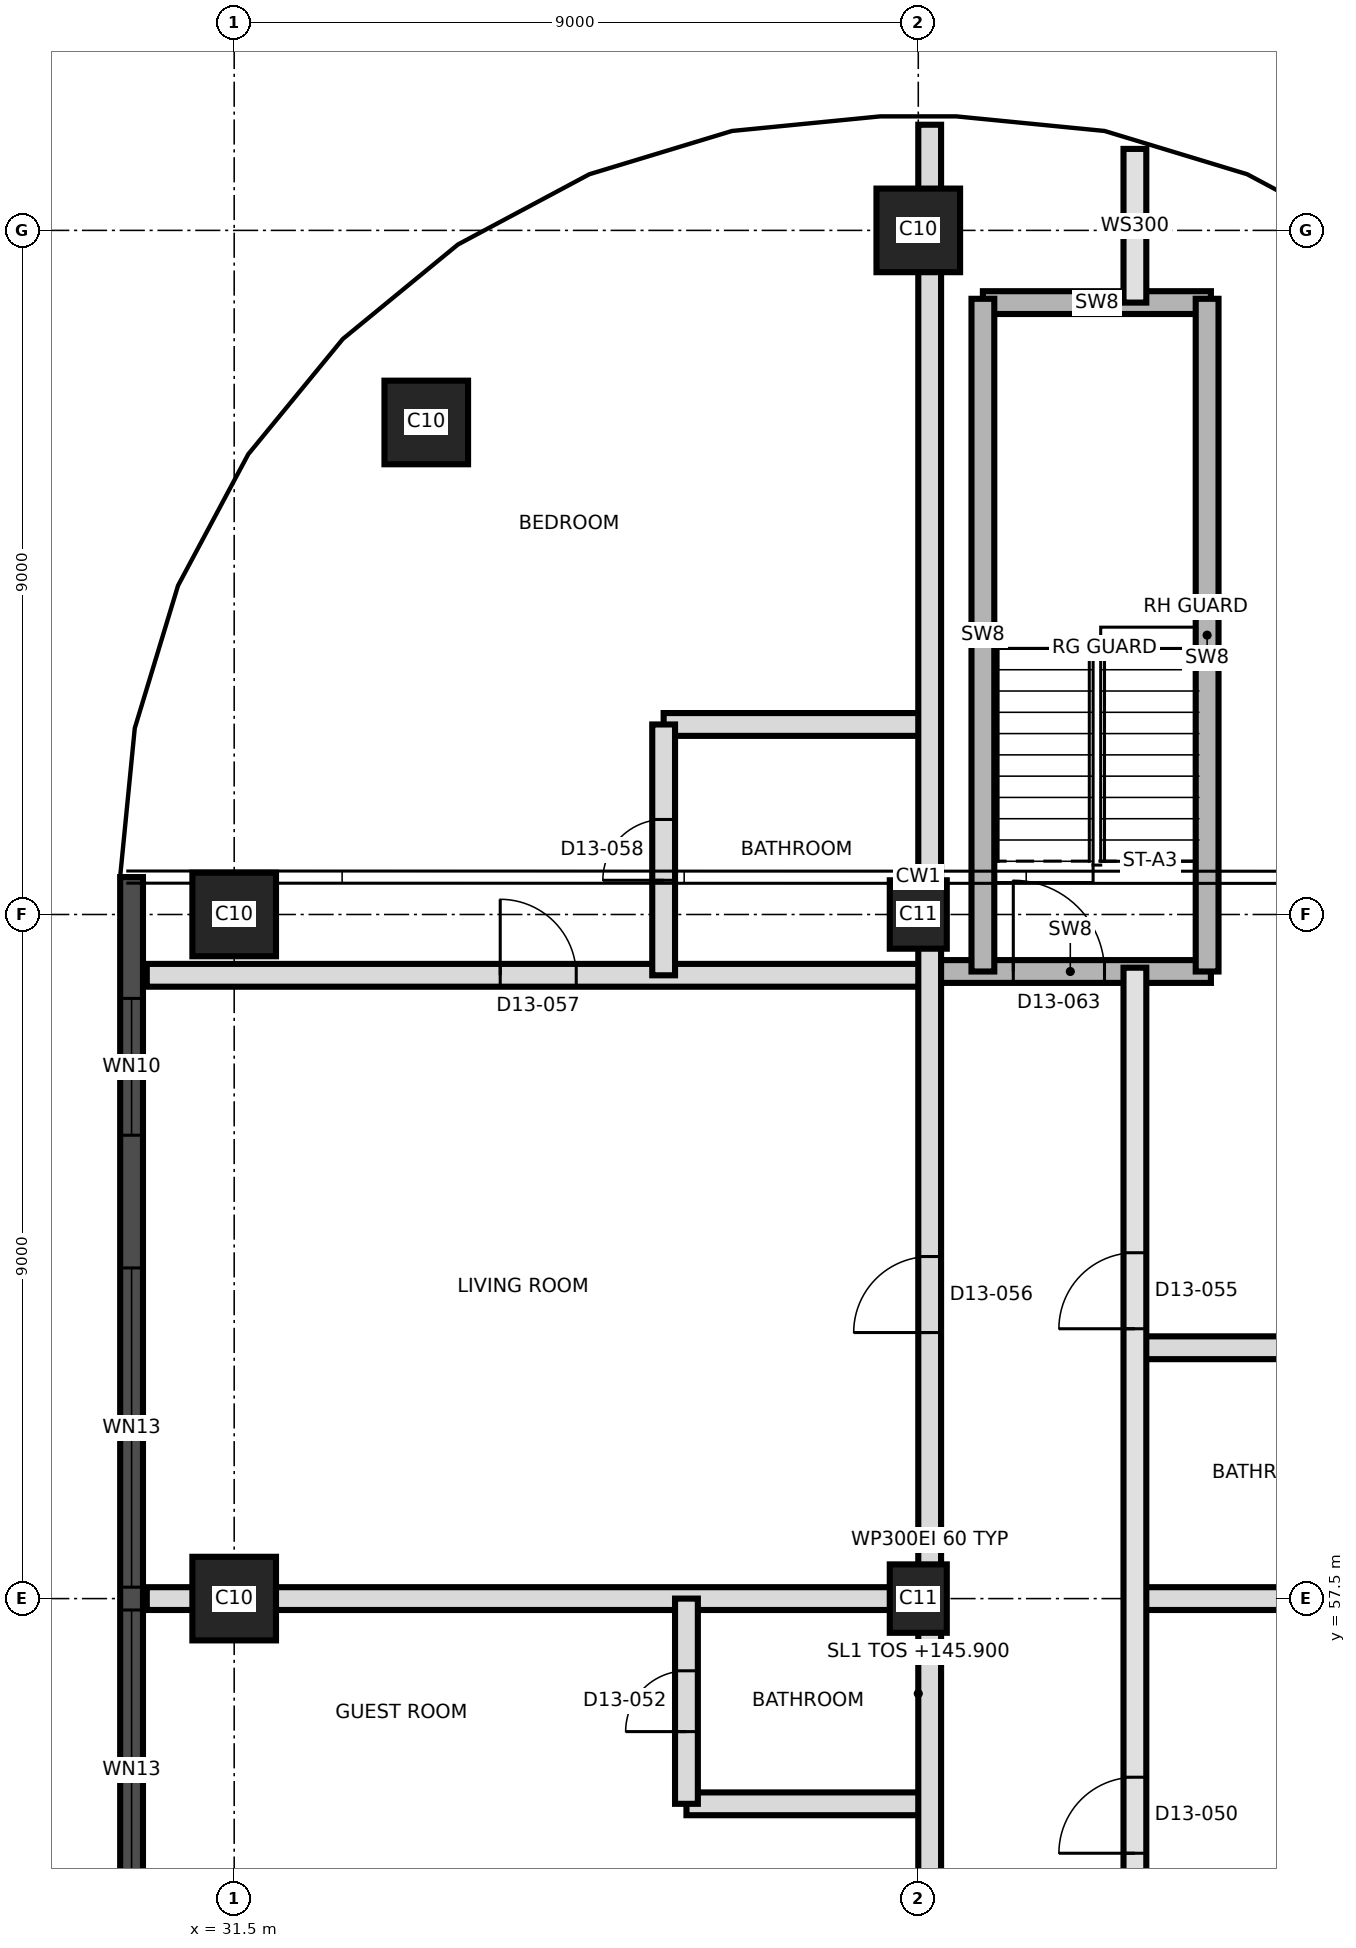
"""IFC4 building model, lengths in metres.
Left out: names, types, materials, properties, quantities, classifications, styles, units other than length and angle.
Written with IfcOpenShell. Run it as: python <this file> out.ifc"""

import sys

from ifc_helpers import new_model, si_unit, direction, frame, frame_2d, origin, origin_2d, place, context, subcontext, project, spatial, rectangle, extrude, element, fill, save


model = new_model("IFC4")
c1 = context("Model", 3, precision=1e-05, world=origin(), true_north=direction((0.0, 1.0)))
c2 = subcontext(c1, "Body", "Model", "MODEL_VIEW")
j1 = project(units=[si_unit("LENGTHUNIT", "METRE"), si_unit("PLANEANGLEUNIT", "RADIAN")], contexts=[c1])
p1 = place(None, origin())
s1 = spatial("IfcSite", under=j1, at=p1, CompositionType="ELEMENT")
p2 = place(p1, origin())
s2 = spatial("IfcBuilding", under=s1, at=p2, CompositionType="ELEMENT")
p3 = place(p2, frame((0.0, 0.0, 145.9)))
s3 = spatial("IfcBuildingStorey", under=s2, at=p3, CompositionType="ELEMENT", Elevation=145.9)
p4 = place(p3, frame((31.5, 57.5, 0.0), z_axis=(0.0, 0.0, 1.0), x_axis=(1.0, 0.0, 0.0)))
e1 = element("IfcColumn", 1, at=p4, inside=s3, PredefinedType="COLUMN", context=c2, shape_type="SweptSolid", body=[
    extrude(rectangle(XDim=1.1, YDim=1.1, at=origin_2d()), origin(), (0.0, 0.0, 1.0), 3.7),
])
p5 = place(p3, frame((40.5, 57.5, 0.0), z_axis=(0.0, 0.0, 1.0), x_axis=(0.0, 1.0, 0.0)))
e2 = element("IfcColumn", 2, at=p5, inside=s3, PredefinedType="COLUMN", context=c2, shape_type="SweptSolid", body=[
    extrude(rectangle(XDim=0.9, YDim=0.75, at=origin_2d()), origin(), (0.0, 0.0, 1.0), 3.7),
])
p6 = place(p3, frame((31.5, 66.5, 0.0), z_axis=(0.0, 0.0, 1.0), x_axis=(1.0, 0.0, 0.0)))
e3 = element("IfcColumn", 3, at=p6, inside=s3, PredefinedType="COLUMN", context=c2, shape_type="SweptSolid", body=[
    extrude(rectangle(XDim=1.1, YDim=1.1, at=origin_2d()), origin(), (0.0, 0.0, 1.0), 3.7),
])
p7 = place(p3, frame((40.5, 66.5, 0.0), z_axis=(0.0, 0.0, 1.0), x_axis=(0.0, 1.0, 0.0)))
e4 = element("IfcColumn", 4, at=p7, inside=s3, PredefinedType="COLUMN", context=c2, shape_type="SweptSolid", body=[
    extrude(rectangle(XDim=0.9, YDim=0.75, at=origin_2d()), origin(), (0.0, 0.0, 1.0), 3.7),
])
for number, where, z_axis, x_axis in (
    (5, (34.027, 72.973, 0.0), (0.0, 0.0, 1.0), (1.0, 0.0, 0.0)),
    (6, (40.5, 75.5, 0.0), (0.0, 0.0, 1.0), (1.0, 0.0, 0.0)),
):
    element("IfcColumn", number, at=place(p3, frame(where, z_axis=z_axis, x_axis=x_axis)), inside=s3, PredefinedType="COLUMN", context=c2, shape_type="SweptSolid", body=[
        extrude(rectangle(XDim=1.1, YDim=1.1, at=origin_2d()), origin(), (0.0, 0.0, 1.0), 3.7),
    ])
p8 = place(p3, frame((30.15, 66.992, 0.0), z_axis=(0.0, 0.0, 1.0), x_axis=(0.0, -1.0, 0.0)))
e7 = element("IfcWall", 7, at=p8, inside=s3, PredefinedType="SOLIDWALL", context=c2, shape_type="SweptSolid", body=[
    extrude(rectangle(XDim=32.968, YDim=0.3, at=frame_2d((16.484, 0.0))), origin(), (0.0, 0.0, 1.0), 3.4),
])
p9 = place(p8, frame((1.596, 0.0, 0.3)))
e8 = element("IfcOpeningElement", 8, at=p9, cuts=e7, PredefinedType="OPENING", context=c2, shape_type="SweptSolid", body=[
    extrude(rectangle(XDim=1.8, YDim=2.4, at=frame_2d((0.9, 1.2))), frame((0.0, 0.16, 0.0), z_axis=(0.0, -1.0, 0.0), x_axis=(1.0, 0.0, 0.0)), (0.0, 0.0, 1.0), 0.32),
])
p10 = place(p8, frame((5.142, 0.0, 0.9)))
e9 = element("IfcOpeningElement", 9, at=p10, cuts=e7, PredefinedType="OPENING", context=c2, shape_type="SweptSolid", body=[
    extrude(rectangle(XDim=4.2, YDim=1.7, at=frame_2d((2.1, 0.85))), frame((0.0, 0.16, 0.0), z_axis=(0.0, -1.0, 0.0), x_axis=(1.0, 0.0, 0.0)), (0.0, 0.0, 1.0), 0.32),
])
p11 = place(p8, frame((9.642, 0.0, 0.9)))
e10 = element("IfcOpeningElement", 10, at=p11, cuts=e7, PredefinedType="OPENING", context=c2, shape_type="SweptSolid", body=[
    extrude(rectangle(XDim=4.2, YDim=1.7, at=frame_2d((2.1, 0.85))), frame((0.0, 0.16, 0.0), z_axis=(0.0, -1.0, 0.0), x_axis=(1.0, 0.0, 0.0)), (0.0, 0.0, 1.0), 0.32),
])
p12 = place(p8, frame((14.142, 0.0, 0.9)))
e11 = element("IfcOpeningElement", 11, at=p12, cuts=e7, PredefinedType="OPENING", context=c2, shape_type="SweptSolid", body=[
    extrude(rectangle(XDim=4.2, YDim=1.7, at=frame_2d((2.1, 0.85))), frame((0.0, 0.16, 0.0), z_axis=(0.0, -1.0, 0.0), x_axis=(1.0, 0.0, 0.0)), (0.0, 0.0, 1.0), 0.32),
])
p13 = place(p8, frame((18.642, 0.0, 0.9)))
e12 = element("IfcOpeningElement", 12, at=p13, cuts=e7, PredefinedType="OPENING", context=c2, shape_type="SweptSolid", body=[
    extrude(rectangle(XDim=4.2, YDim=1.7, at=frame_2d((2.1, 0.85))), frame((0.0, 0.16, 0.0), z_axis=(0.0, -1.0, 0.0), x_axis=(1.0, 0.0, 0.0)), (0.0, 0.0, 1.0), 0.32),
])
p14 = place(p8, frame((23.142, 0.0, 0.9)))
e13 = element("IfcOpeningElement", 13, at=p14, cuts=e7, PredefinedType="OPENING", context=c2, shape_type="SweptSolid", body=[
    extrude(rectangle(XDim=4.2, YDim=1.7, at=frame_2d((2.1, 0.85))), frame((0.0, 0.16, 0.0), z_axis=(0.0, -1.0, 0.0), x_axis=(1.0, 0.0, 0.0)), (0.0, 0.0, 1.0), 0.32),
])
p15 = place(p8, frame((29.33, 0.0, 0.3)))
e14 = element("IfcOpeningElement", 14, at=p15, cuts=e7, PredefinedType="OPENING", context=c2, shape_type="SweptSolid", body=[
    extrude(rectangle(XDim=1.8, YDim=2.4, at=frame_2d((0.9, 1.2))), frame((0.0, 0.16, 0.0), z_axis=(0.0, -1.0, 0.0), x_axis=(1.0, 0.0, 0.0)), (0.0, 0.0, 1.0), 0.32),
])
p16 = place(p3, frame((37.45, 54.8, 0.0), z_axis=(0.0, 0.0, 1.0), x_axis=(1.0, 0.0, 0.0)))
e15 = element("IfcWall", 15, at=p16, inside=s3, PredefinedType="PARTITIONING", context=c2, shape_type="SweptSolid", body=[
    extrude(rectangle(XDim=3.2, YDim=0.3, at=frame_2d((1.6, 0.0))), origin(), (0.0, 0.0, 1.0), 3.4),
])
p17 = place(p3, frame((30.35, 57.5, 0.0), z_axis=(0.0, 0.0, 1.0), x_axis=(1.0, 0.0, 0.0)))
e16 = element("IfcWall", 16, at=p17, inside=s3, PredefinedType="PARTITIONING", context=c2, shape_type="SweptSolid", body=[
    extrude(rectangle(XDim=10.3, YDim=0.3, at=frame_2d((5.15, 0.0))), origin(), (0.0, 0.0, 1.0), 3.4),
])
p18 = place(p3, frame((43.35, 57.5, 0.0), z_axis=(0.0, 0.0, 1.0), x_axis=(1.0, 0.0, 0.0)))
e17 = element("IfcWall", 17, at=p18, inside=s3, PredefinedType="PARTITIONING", context=c2, shape_type="SweptSolid", body=[
    extrude(rectangle(XDim=7.48, YDim=0.3, at=frame_2d((3.74, 0.0))), origin(), (0.0, 0.0, 1.0), 3.4),
])
p19 = place(p3, frame((43.35, 60.8, 0.0), z_axis=(0.0, 0.0, 1.0), x_axis=(1.0, 0.0, 0.0)))
e18 = element("IfcWall", 18, at=p19, inside=s3, PredefinedType="PARTITIONING", context=c2, shape_type="SweptSolid", body=[
    extrude(rectangle(XDim=3.5, YDim=0.3, at=frame_2d((1.75, 0.0))), origin(), (0.0, 0.0, 1.0), 3.4),
])
p20 = place(p3, frame((30.35, 65.7, 0.0), z_axis=(0.0, 0.0, 1.0), x_axis=(1.0, 0.0, 0.0)))
e19 = element("IfcWall", 19, at=p20, inside=s3, PredefinedType="PARTITIONING", context=c2, shape_type="SweptSolid", body=[
    extrude(rectangle(XDim=10.3, YDim=0.3, at=frame_2d((5.15, 0.0))), origin(), (0.0, 0.0, 1.0), 3.4),
])
p21 = place(p20, frame((4.65, 0.0, 0.0)))
e20 = element("IfcOpeningElement", 20, at=p21, cuts=e19, PredefinedType="OPENING", context=c2, shape_type="SweptSolid", body=[
    extrude(rectangle(XDim=1.0, YDim=2.1, at=frame_2d((0.5, 1.05))), frame((0.0, 0.16, 0.0), z_axis=(0.0, -1.0, 0.0), x_axis=(1.0, 0.0, 0.0)), (0.0, 0.0, 1.0), 0.32),
])
p22 = place(p3, frame((40.65, 65.75, 0.0), z_axis=(0.0, 0.0, 1.0), x_axis=(1.0, 0.0, 0.0)))
e21 = element("IfcWall", 21, at=p22, inside=s3, PredefinedType="SHEAR", context=c2, shape_type="SweptSolid", body=[
    extrude(rectangle(XDim=3.7, YDim=0.3, at=frame_2d((1.85, 0.0))), origin(), (0.0, 0.0, 1.0), 3.4),
])
p23 = place(p22, frame((1.1, 0.0, 0.0)))
e22 = element("IfcOpeningElement", 22, at=p23, cuts=e21, PredefinedType="OPENING", context=c2, shape_type="SweptSolid", body=[
    extrude(rectangle(XDim=1.2, YDim=2.1, at=frame_2d((0.6, 1.05))), frame((0.0, 0.16, 0.0), z_axis=(0.0, -1.0, 0.0), x_axis=(1.0, 0.0, 0.0)), (0.0, 0.0, 1.0), 0.32),
])
p24 = place(p3, frame((37.15, 69.0, 0.0), z_axis=(0.0, 0.0, 1.0), x_axis=(1.0, 0.0, 0.0)))
e23 = element("IfcWall", 23, at=p24, inside=s3, PredefinedType="PARTITIONING", context=c2, shape_type="SweptSolid", body=[
    extrude(rectangle(XDim=3.5, YDim=0.3, at=frame_2d((1.75, 0.0))), origin(), (0.0, 0.0, 1.0), 3.4),
])
p25 = place(p3, frame((41.35, 74.55, 0.0), z_axis=(0.0, 0.0, 1.0), x_axis=(1.0, 0.0, 0.0)))
e24 = element("IfcWall", 24, at=p25, inside=s3, PredefinedType="SHEAR", context=c2, shape_type="SweptSolid", body=[
    extrude(rectangle(XDim=3.0, YDim=0.3, at=frame_2d((1.5, 0.0))), origin(), (0.0, 0.0, 1.0), 3.4),
])
p26 = place(p3, frame((37.15, 65.7, 0.0), z_axis=(0.0, 0.0, 1.0), x_axis=(0.0, 1.0, 0.0)))
e25 = element("IfcWall", 25, at=p26, inside=s3, PredefinedType="PARTITIONING", context=c2, shape_type="SweptSolid", body=[
    extrude(rectangle(XDim=3.3, YDim=0.3, at=frame_2d((1.65, 0.0))), origin(), (0.0, 0.0, 1.0), 3.4),
])
p27 = place(p26, frame((1.25, 0.0, 0.0)))
e26 = element("IfcOpeningElement", 26, at=p27, cuts=e25, PredefinedType="OPENING", context=c2, shape_type="SweptSolid", body=[
    extrude(rectangle(XDim=0.8, YDim=2.1, at=frame_2d((0.4, 1.05))), frame((0.0, 0.16, 0.0), z_axis=(0.0, -1.0, 0.0), x_axis=(1.0, 0.0, 0.0)), (0.0, 0.0, 1.0), 0.32),
])
p28 = place(p3, frame((37.45, 54.8, 0.0), z_axis=(0.0, 0.0, 1.0), x_axis=(0.0, 1.0, 0.0)))
e27 = element("IfcWall", 27, at=p28, inside=s3, PredefinedType="PARTITIONING", context=c2, shape_type="SweptSolid", body=[
    extrude(rectangle(XDim=2.7, YDim=0.3, at=frame_2d((1.35, 0.0))), origin(), (0.0, 0.0, 1.0), 3.4),
])
p29 = place(p28, frame((0.95, 0.0, 0.0)))
e28 = element("IfcOpeningElement", 28, at=p29, cuts=e27, PredefinedType="OPENING", context=c2, shape_type="SweptSolid", body=[
    extrude(rectangle(XDim=0.8, YDim=2.1, at=frame_2d((0.4, 1.05))), frame((0.0, 0.16, 0.0), z_axis=(0.0, -1.0, 0.0), x_axis=(1.0, 0.0, 0.0)), (0.0, 0.0, 1.0), 0.32),
])
p30 = place(p3, frame((40.65, 39.65, 0.0), z_axis=(0.0, 0.0, 1.0), x_axis=(0.0, 1.0, 0.0)))
e29 = element("IfcWall", 29, at=p30, inside=s3, PredefinedType="PARTITIONING", context=c2, shape_type="SweptSolid", body=[
    extrude(rectangle(XDim=37.24, YDim=0.3, at=frame_2d((18.62, 0.0))), origin(), (0.0, 0.0, 1.0), 3.4),
])
p31 = place(p30, frame((0.52, 0.0, 0.0)))
e30 = element("IfcOpeningElement", 30, at=p31, cuts=e29, PredefinedType="OPENING", context=c2, shape_type="SweptSolid", body=[
    extrude(rectangle(XDim=1.0, YDim=2.1, at=frame_2d((0.5, 1.05))), frame((0.0, 0.16, 0.0), z_axis=(0.0, -1.0, 0.0), x_axis=(1.0, 0.0, 0.0)), (0.0, 0.0, 1.0), 0.32),
])
p32 = place(p30, frame((6.37, 0.0, 0.0)))
e31 = element("IfcOpeningElement", 31, at=p32, cuts=e29, PredefinedType="OPENING", context=c2, shape_type="SweptSolid", body=[
    extrude(rectangle(XDim=1.0, YDim=2.1, at=frame_2d((0.5, 1.05))), frame((0.0, 0.16, 0.0), z_axis=(0.0, -1.0, 0.0), x_axis=(1.0, 0.0, 0.0)), (0.0, 0.0, 1.0), 0.32),
])
p33 = place(p30, frame((9.985, 0.0, 0.0)))
e32 = element("IfcOpeningElement", 32, at=p33, cuts=e29, PredefinedType="OPENING", context=c2, shape_type="SweptSolid", body=[
    extrude(rectangle(XDim=1.2, YDim=2.1, at=frame_2d((0.6, 1.05))), frame((0.0, 0.16, 0.0), z_axis=(0.0, -1.0, 0.0), x_axis=(1.0, 0.0, 0.0)), (0.0, 0.0, 1.0), 0.32),
])
p34 = place(p30, frame((13.235, 0.0, 0.0)))
e33 = element("IfcOpeningElement", 33, at=p34, cuts=e29, PredefinedType="OPENING", context=c2, shape_type="SweptSolid", body=[
    extrude(rectangle(XDim=1.0, YDim=2.1, at=frame_2d((0.5, 1.05))), frame((0.0, 0.16, 0.0), z_axis=(0.0, -1.0, 0.0), x_axis=(1.0, 0.0, 0.0)), (0.0, 0.0, 1.0), 0.32),
])
p35 = place(p30, frame((21.35, 0.0, 0.0)))
e34 = element("IfcOpeningElement", 34, at=p35, cuts=e29, PredefinedType="OPENING", context=c2, shape_type="SweptSolid", body=[
    extrude(rectangle(XDim=1.0, YDim=2.4, at=frame_2d((0.5, 1.2))), frame((0.0, 0.16, 0.0), z_axis=(0.0, -1.0, 0.0), x_axis=(1.0, 0.0, 0.0)), (0.0, 0.0, 1.0), 0.32),
])
p36 = place(p3, frame((41.35, 65.75, 0.0), z_axis=(0.0, 0.0, 1.0), x_axis=(0.0, 1.0, 0.0)))
e35 = element("IfcWall", 35, at=p36, inside=s3, PredefinedType="SHEAR", context=c2, shape_type="SweptSolid", body=[
    extrude(rectangle(XDim=8.85, YDim=0.3, at=frame_2d((4.425, 0.0))), origin(), (0.0, 0.0, 1.0), 3.4),
])
p37 = place(p3, frame((43.35, 39.65, 0.0), z_axis=(0.0, 0.0, 1.0), x_axis=(0.0, 1.0, 0.0)))
e36 = element("IfcWall", 36, at=p37, inside=s3, PredefinedType="SOLIDWALL", context=c2, shape_type="SweptSolid", body=[
    extrude(rectangle(XDim=26.15, YDim=0.3, at=frame_2d((13.075, 0.0))), origin(), (0.0, 0.0, 1.0), 3.4),
])
p38 = place(p37, frame((0.985, 0.0, 0.0)))
e37 = element("IfcOpeningElement", 37, at=p38, cuts=e36, PredefinedType="OPENING", context=c2, shape_type="SweptSolid", body=[
    extrude(rectangle(XDim=1.2, YDim=2.1, at=frame_2d((0.6, 1.05))), frame((0.0, 0.16, 0.0), z_axis=(0.0, -1.0, 0.0), x_axis=(1.0, 0.0, 0.0)), (0.0, 0.0, 1.0), 0.32),
])
p39 = place(p37, frame((4.235, 0.0, 0.0)))
e38 = element("IfcOpeningElement", 38, at=p39, cuts=e36, PredefinedType="OPENING", context=c2, shape_type="SweptSolid", body=[
    extrude(rectangle(XDim=1.0, YDim=2.1, at=frame_2d((0.5, 1.05))), frame((0.0, 0.16, 0.0), z_axis=(0.0, -1.0, 0.0), x_axis=(1.0, 0.0, 0.0)), (0.0, 0.0, 1.0), 0.32),
])
p40 = place(p37, frame((14.5, 0.0, 0.0)))
e39 = element("IfcOpeningElement", 39, at=p40, cuts=e36, PredefinedType="OPENING", context=c2, shape_type="SweptSolid", body=[
    extrude(rectangle(XDim=1.0, YDim=2.4, at=frame_2d((0.5, 1.2))), frame((0.0, 0.16, 0.0), z_axis=(0.0, -1.0, 0.0), x_axis=(1.0, 0.0, 0.0)), (0.0, 0.0, 1.0), 0.32),
])
p41 = place(p37, frame((21.4, 0.0, 0.0)))
e40 = element("IfcOpeningElement", 40, at=p41, cuts=e36, PredefinedType="OPENING", context=c2, shape_type="SweptSolid", body=[
    extrude(rectangle(XDim=1.0, YDim=2.4, at=frame_2d((0.5, 1.2))), frame((0.0, 0.16, 0.0), z_axis=(0.0, -1.0, 0.0), x_axis=(1.0, 0.0, 0.0)), (0.0, 0.0, 1.0), 0.32),
])
p42 = place(p3, frame((43.35, 74.55, 0.0), z_axis=(0.0, 0.0, 1.0), x_axis=(0.0, 1.0, 0.0)))
e41 = element("IfcWall", 41, at=p42, inside=s3, PredefinedType="SOLIDWALL", context=c2, shape_type="SweptSolid", body=[
    extrude(rectangle(XDim=2.022, YDim=0.3, at=frame_2d((1.011, 0.0))), origin(), (0.0, 0.0, 1.0), 3.4),
])
p43 = place(p3, frame((44.3, 65.75, 0.0), z_axis=(0.0, 0.0, 1.0), x_axis=(0.0, 1.0, 0.0)))
e42 = element("IfcWall", 42, at=p43, inside=s3, PredefinedType="SHEAR", context=c2, shape_type="SweptSolid", body=[
    extrude(rectangle(XDim=8.85, YDim=0.3, at=frame_2d((4.425, 0.0))), origin(), (0.0, 0.0, 1.0), 3.4),
])
p44 = place(p9, origin())
e43 = element("IfcWindow", 43, at=p44, inside=s3, PartitioningType="SINGLE_PANEL", PredefinedType="WINDOW", context=c2, shape_type="SweptSolid", body=[
    extrude(rectangle(XDim=1.8, YDim=2.4, at=frame_2d((0.9, 1.2))), frame((0.0, 0.03, 0.0), z_axis=(0.0, -1.0, 0.0), x_axis=(1.0, 0.0, 0.0)), (0.0, 0.0, 1.0), 0.06),
])
fill(e8, e43)
p45 = place(p10, origin())
e44 = element("IfcWindow", 44, at=p45, inside=s3, PartitioningType="SINGLE_PANEL", PredefinedType="WINDOW", context=c2, shape_type="SweptSolid", body=[
    extrude(rectangle(XDim=4.2, YDim=1.7, at=frame_2d((2.1, 0.85))), frame((0.0, 0.03, 0.0), z_axis=(0.0, -1.0, 0.0), x_axis=(1.0, 0.0, 0.0)), (0.0, 0.0, 1.0), 0.06),
])
fill(e9, e44)
p46 = place(p11, origin())
e45 = element("IfcWindow", 45, at=p46, inside=s3, PartitioningType="SINGLE_PANEL", PredefinedType="WINDOW", context=c2, shape_type="SweptSolid", body=[
    extrude(rectangle(XDim=4.2, YDim=1.7, at=frame_2d((2.1, 0.85))), frame((0.0, 0.03, 0.0), z_axis=(0.0, -1.0, 0.0), x_axis=(1.0, 0.0, 0.0)), (0.0, 0.0, 1.0), 0.06),
])
fill(e10, e45)
p47 = place(p40, origin())
e46 = element("IfcDoor", 46, at=p47, inside=s3, OperationType="SINGLE_SWING_RIGHT", PredefinedType="DOOR", context=c2, shape_type="SweptSolid", body=[
    extrude(rectangle(XDim=1.0, YDim=2.4, at=frame_2d((0.5, 1.2))), frame((0.0, 0.025, 0.0), z_axis=(0.0, -1.0, 0.0), x_axis=(1.0, 0.0, 0.0)), (0.0, 0.0, 1.0), 0.05),
])
fill(e39, e46)
p48 = place(p29, origin())
e47 = element("IfcDoor", 47, at=p48, inside=s3, OperationType="SINGLE_SWING_LEFT", PredefinedType="DOOR", context=c2, shape_type="SweptSolid", body=[
    extrude(rectangle(XDim=0.8, YDim=2.1, at=frame_2d((0.4, 1.05))), frame((0.0, 0.025, 0.0), z_axis=(0.0, -1.0, 0.0), x_axis=(1.0, 0.0, 0.0)), (0.0, 0.0, 1.0), 0.05),
])
fill(e28, e47)
p49 = place(p41, origin())
e48 = element("IfcDoor", 48, at=p49, inside=s3, OperationType="SINGLE_SWING_LEFT", PredefinedType="DOOR", context=c2, shape_type="SweptSolid", body=[
    extrude(rectangle(XDim=1.0, YDim=2.4, at=frame_2d((0.5, 1.2))), frame((0.0, 0.025, 0.0), z_axis=(0.0, -1.0, 0.0), x_axis=(1.0, 0.0, 0.0)), (0.0, 0.0, 1.0), 0.05),
])
fill(e40, e48)
p50 = place(p35, origin())
e49 = element("IfcDoor", 49, at=p50, inside=s3, OperationType="SINGLE_SWING_LEFT", PredefinedType="DOOR", context=c2, shape_type="SweptSolid", body=[
    extrude(rectangle(XDim=1.0, YDim=2.4, at=frame_2d((0.5, 1.2))), frame((0.0, 0.025, 0.0), z_axis=(0.0, -1.0, 0.0), x_axis=(1.0, 0.0, 0.0)), (0.0, 0.0, 1.0), 0.05),
])
fill(e34, e49)
p51 = place(p21, origin())
e50 = element("IfcDoor", 50, at=p51, inside=s3, OperationType="SINGLE_SWING_LEFT", PredefinedType="DOOR", context=c2, shape_type="SweptSolid", body=[
    extrude(rectangle(XDim=1.0, YDim=2.1, at=frame_2d((0.5, 1.05))), frame((0.0, 0.025, 0.0), z_axis=(0.0, -1.0, 0.0), x_axis=(1.0, 0.0, 0.0)), (0.0, 0.0, 1.0), 0.05),
])
fill(e20, e50)
p52 = place(p27, origin())
e51 = element("IfcDoor", 51, at=p52, inside=s3, OperationType="SINGLE_SWING_RIGHT", PredefinedType="DOOR", context=c2, shape_type="SweptSolid", body=[
    extrude(rectangle(XDim=0.8, YDim=2.1, at=frame_2d((0.4, 1.05))), frame((0.0, 0.025, 0.0), z_axis=(0.0, -1.0, 0.0), x_axis=(1.0, 0.0, 0.0)), (0.0, 0.0, 1.0), 0.05),
])
fill(e26, e51)
p53 = place(p23, origin())
e52 = element("IfcDoor", 52, at=p53, inside=s3, OperationType="SINGLE_SWING_RIGHT", PredefinedType="DOOR", context=c2, shape_type="SweptSolid", body=[
    extrude(rectangle(XDim=1.2, YDim=2.1, at=frame_2d((0.6, 1.05))), frame((0.0, 0.025, 0.0), z_axis=(0.0, -1.0, 0.0), x_axis=(1.0, 0.0, 0.0)), (0.0, 0.0, 1.0), 0.05),
])
fill(e22, e52)
save(model, sys.argv[1])
